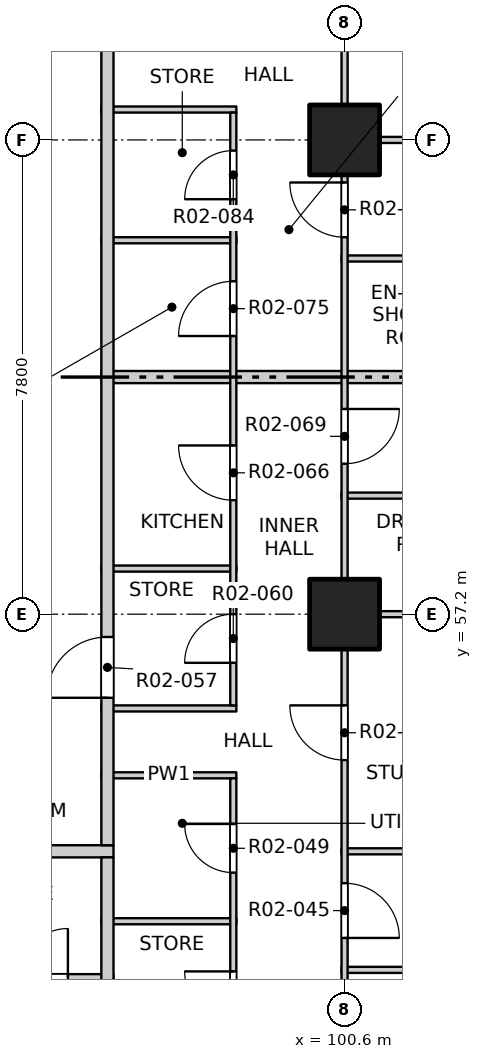
"""IFC4 building model, lengths in metres.
Left out: names, types, materials, properties, quantities, classifications, styles, units other than length and angle.
Written with IfcOpenShell. Run it as: python <this file> out.ifc"""

import sys

from ifc_helpers import new_model, si_unit, direction, frame, frame_2d, origin, origin_2d, place, context, subcontext, project, spatial, rectangle, extrude, element, fill, save


model = new_model("IFC4")
c1 = context("Model", 3, precision=1e-05, world=origin(), true_north=direction((0.0, 1.0)))
c2 = subcontext(c1, "Body", "Model", "MODEL_VIEW")
j1 = project(units=[si_unit("LENGTHUNIT", "METRE"), si_unit("PLANEANGLEUNIT", "RADIAN")], contexts=[c1])
p1 = place(None, origin())
s1 = spatial("IfcSite", under=j1, at=p1, CompositionType="ELEMENT")
p2 = place(p1, origin())
s2 = spatial("IfcBuilding", under=s1, at=p2, CompositionType="ELEMENT")
p3 = place(p2, frame((0.0, 0.0, 36.5)))
s3 = spatial("IfcBuildingStorey", under=s2, at=p3, CompositionType="ELEMENT", Elevation=36.5)
for number, where, z_axis, x_axis in (
    (1, (100.6, 57.2, -0.25), (0.0, 0.0, 1.0), (1.0, 0.0, 0.0)),
    (2, (100.6, 65.0, -0.25), (0.0, 0.0, 1.0), (1.0, 0.0, 0.0)),
):
    element("IfcColumn", number, at=place(p3, frame(where, z_axis=z_axis, x_axis=x_axis)), inside=s3, PredefinedType="COLUMN", context=c2, shape_type="SweptSolid", body=[
        extrude(rectangle(XDim=1.15, YDim=1.15, at=origin_2d()), origin(), (0.0, 0.0, 1.0), 3.4),
    ])
p4 = place(p3, frame((90.9, 51.23, 0.0), z_axis=(0.0, 0.0, 1.0), x_axis=(1.0, 0.0, 0.0)))
e3 = element("IfcWall", 3, at=p4, inside=s3, PredefinedType="PARTITIONING", context=c2, shape_type="SweptSolid", body=[
    extrude(rectangle(XDim=5.9, YDim=0.1, at=frame_2d((2.95, 0.0))), origin(), (0.0, 0.0, 1.0), 3.15),
])
p5 = place(p4, frame((0.5, 0.0, 0.0)))
e4 = element("IfcOpeningElement", 4, at=p5, cuts=e3, PredefinedType="OPENING", context=c2, shape_type="SweptSolid", body=[
    extrude(rectangle(XDim=0.9, YDim=2.1, at=frame_2d((0.45, 1.05))), frame((0.0, 0.06, 0.0), z_axis=(0.0, -1.0, 0.0), x_axis=(1.0, 0.0, 0.0)), (0.0, 0.0, 1.0), 0.12),
])
p6 = place(p4, frame((2.375, 0.0, 0.0)))
e5 = element("IfcOpeningElement", 5, at=p6, cuts=e3, PredefinedType="OPENING", context=c2, shape_type="SweptSolid", body=[
    extrude(rectangle(XDim=0.8, YDim=2.1, at=frame_2d((0.4, 1.05))), frame((0.0, 0.06, 0.0), z_axis=(0.0, -1.0, 0.0), x_axis=(1.0, 0.0, 0.0)), (0.0, 0.0, 1.0), 0.12),
])
p7 = place(p4, frame((4.35, 0.0, 0.0)))
e6 = element("IfcOpeningElement", 6, at=p7, cuts=e3, PredefinedType="OPENING", context=c2, shape_type="SweptSolid", body=[
    extrude(rectangle(XDim=0.8, YDim=2.1, at=frame_2d((0.4, 1.05))), frame((0.0, 0.06, 0.0), z_axis=(0.0, -1.0, 0.0), x_axis=(1.0, 0.0, 0.0)), (0.0, 0.0, 1.0), 0.12),
])
p8 = place(p3, frame((100.55, 51.35, 0.0), z_axis=(0.0, 0.0, 1.0), x_axis=(1.0, 0.0, 0.0)))
e7 = element("IfcWall", 7, at=p8, inside=s3, PredefinedType="PARTITIONING", context=c2, shape_type="SweptSolid", body=[
    extrude(rectangle(XDim=3.55, YDim=0.1, at=frame_2d((1.775, 0.0))), origin(), (0.0, 0.0, 1.0), 3.15),
])
p9 = place(p3, frame((96.6, 52.15, 0.0), z_axis=(0.0, 0.0, 1.0), x_axis=(1.0, 0.0, 0.0)))
e8 = element("IfcWall", 8, at=p9, inside=s3, PredefinedType="PARTITIONING", context=c2, shape_type="SweptSolid", body=[
    extrude(rectangle(XDim=2.22, YDim=0.1, at=frame_2d((1.11, 0.0))), origin(), (0.0, 0.0, 1.0), 3.15),
])
p10 = place(p3, frame((73.2, 53.3, 0.0), z_axis=(0.0, 0.0, 1.0), x_axis=(1.0, 0.0, 0.0)))
e9 = element("IfcWall", 9, at=p10, inside=s3, PredefinedType="PARTITIONING", context=c2, shape_type="SweptSolid", body=[
    extrude(rectangle(XDim=23.6, YDim=0.2, at=frame_2d((11.8, 0.0))), origin(), (0.0, 0.0, 1.0), 3.15),
])
p11 = place(p10, frame((5.925, 0.0, 0.0)))
e10 = element("IfcOpeningElement", 10, at=p11, cuts=e9, PredefinedType="OPENING", context=c2, shape_type="SweptSolid", body=[
    extrude(rectangle(XDim=1.0, YDim=2.1, at=frame_2d((0.5, 1.05))), frame((0.0, 0.11, 0.0), z_axis=(0.0, -1.0, 0.0), x_axis=(1.0, 0.0, 0.0)), (0.0, 0.0, 1.0), 0.22),
])
p12 = place(p10, frame((17.925, 0.0, 0.0)))
e11 = element("IfcOpeningElement", 11, at=p12, cuts=e9, PredefinedType="OPENING", context=c2, shape_type="SweptSolid", body=[
    extrude(rectangle(XDim=1.0, YDim=2.1, at=frame_2d((0.5, 1.05))), frame((0.0, 0.11, 0.0), z_axis=(0.0, -1.0, 0.0), x_axis=(1.0, 0.0, 0.0)), (0.0, 0.0, 1.0), 0.22),
])
p13 = place(p3, frame((100.55, 53.3, 0.0), z_axis=(0.0, 0.0, 1.0), x_axis=(1.0, 0.0, 0.0)))
e12 = element("IfcWall", 12, at=p13, inside=s3, PredefinedType="PARTITIONING", context=c2, shape_type="SweptSolid", body=[
    extrude(rectangle(XDim=7.55, YDim=0.1, at=frame_2d((3.775, 0.0))), origin(), (0.0, 0.0, 1.0), 3.15),
])
for number, where, z_axis, x_axis in (
    (13, (96.6, 54.55, 0.0), (0.0, 0.0, 1.0), (1.0, 0.0, 0.0)),
    (14, (96.6, 55.65, 0.0), (0.0, 0.0, 1.0), (1.0, 0.0, 0.0)),
):
    element("IfcWall", number, at=place(p3, frame(where, z_axis=z_axis, x_axis=x_axis)), inside=s3, PredefinedType="PARTITIONING", context=c2, shape_type="SweptSolid", body=[
        extrude(rectangle(XDim=2.22, YDim=0.1, at=frame_2d((1.11, 0.0))), origin(), (0.0, 0.0, 1.0), 3.15),
    ])
p14 = place(p3, frame((100.55, 57.2, 0.0), z_axis=(0.0, 0.0, 1.0), x_axis=(1.0, 0.0, 0.0)))
e15 = element("IfcWall", 15, at=p14, inside=s3, PredefinedType="PARTITIONING", context=c2, shape_type="SweptSolid", body=[
    extrude(rectangle(XDim=7.55, YDim=0.1, at=frame_2d((3.775, 0.0))), origin(), (0.0, 0.0, 1.0), 2.55),
])
p15 = place(p3, frame((96.6, 57.95, 0.0), z_axis=(0.0, 0.0, 1.0), x_axis=(1.0, 0.0, 0.0)))
e16 = element("IfcWall", 16, at=p15, inside=s3, PredefinedType="PARTITIONING", context=c2, shape_type="SweptSolid", body=[
    extrude(rectangle(XDim=2.22, YDim=0.1, at=frame_2d((1.11, 0.0))), origin(), (0.0, 0.0, 1.0), 3.15),
])
p16 = place(p3, frame((100.55, 59.15, 0.0), z_axis=(0.0, 0.0, 1.0), x_axis=(1.0, 0.0, 0.0)))
e17 = element("IfcWall", 17, at=p16, inside=s3, PredefinedType="PARTITIONING", context=c2, shape_type="SweptSolid", body=[
    extrude(rectangle(XDim=3.55, YDim=0.1, at=frame_2d((1.775, 0.0))), origin(), (0.0, 0.0, 1.0), 3.15),
])
p17 = place(p3, frame((96.6, 61.1, 0.0), z_axis=(0.0, 0.0, 1.0), x_axis=(1.0, 0.0, 0.0)))
e18 = element("IfcWall", 18, at=p17, inside=s3, PredefinedType="PARTITIONING", context=c2, shape_type="SweptSolid", body=[
    extrude(rectangle(XDim=11.5, YDim=0.2, at=frame_2d((5.75, 0.0))), origin(), (0.0, 0.0, 1.0), 3.15),
])
p18 = place(p3, frame((100.55, 63.05, 0.0), z_axis=(0.0, 0.0, 1.0), x_axis=(1.0, 0.0, 0.0)))
e19 = element("IfcWall", 19, at=p18, inside=s3, PredefinedType="PARTITIONING", context=c2, shape_type="SweptSolid", body=[
    extrude(rectangle(XDim=3.7, YDim=0.1, at=frame_2d((1.85, 0.0))), origin(), (0.0, 0.0, 1.0), 3.15),
])
p19 = place(p3, frame((96.6, 63.35, 0.0), z_axis=(0.0, 0.0, 1.0), x_axis=(1.0, 0.0, 0.0)))
e20 = element("IfcWall", 20, at=p19, inside=s3, PredefinedType="PARTITIONING", context=c2, shape_type="SweptSolid", body=[
    extrude(rectangle(XDim=2.22, YDim=0.1, at=frame_2d((1.11, 0.0))), origin(), (0.0, 0.0, 1.0), 3.15),
])
p20 = place(p3, frame((100.55, 65.0, 0.0), z_axis=(0.0, 0.0, 1.0), x_axis=(1.0, 0.0, 0.0)))
e21 = element("IfcWall", 21, at=p20, inside=s3, PredefinedType="PARTITIONING", context=c2, shape_type="SweptSolid", body=[
    extrude(rectangle(XDim=7.55, YDim=0.1, at=frame_2d((3.775, 0.0))), origin(), (0.0, 0.0, 1.0), 2.55),
])
p21 = place(p3, frame((96.6, 65.5, 0.0), z_axis=(0.0, 0.0, 1.0), x_axis=(1.0, 0.0, 0.0)))
e22 = element("IfcWall", 22, at=p21, inside=s3, PredefinedType="PARTITIONING", context=c2, shape_type="SweptSolid", body=[
    extrude(rectangle(XDim=2.22, YDim=0.1, at=frame_2d((1.11, 0.0))), origin(), (0.0, 0.0, 1.0), 3.15),
])
p22 = place(p3, frame((96.7, 41.9, 0.0), z_axis=(0.0, 0.0, 1.0), x_axis=(0.0, 1.0, 0.0)))
e23 = element("IfcWall", 23, at=p22, inside=s3, PredefinedType="PARTITIONING", context=c2, shape_type="SweptSolid", body=[
    extrude(rectangle(XDim=11.3, YDim=0.2, at=frame_2d((5.65, 0.0))), origin(), (0.0, 0.0, 1.0), 3.15),
])
p23 = place(p3, frame((96.7, 53.4, 0.0), z_axis=(0.0, 0.0, 1.0), x_axis=(0.0, 1.0, 0.0)))
e24 = element("IfcWall", 24, at=p23, inside=s3, PredefinedType="PARTITIONING", context=c2, shape_type="SweptSolid", body=[
    extrude(rectangle(XDim=31.0, YDim=0.2, at=frame_2d((15.5, 0.0))), origin(), (0.0, 0.0, 1.0), 3.15),
])
p24 = place(p23, frame((2.425, 0.0, 0.0)))
e25 = element("IfcOpeningElement", 25, at=p24, cuts=e24, PredefinedType="OPENING", context=c2, shape_type="SweptSolid", body=[
    extrude(rectangle(XDim=1.0, YDim=2.1, at=frame_2d((0.5, 1.05))), frame((0.0, 0.11, 0.0), z_axis=(0.0, -1.0, 0.0), x_axis=(1.0, 0.0, 0.0)), (0.0, 0.0, 1.0), 0.22),
])
p25 = place(p23, frame((13.375, 0.0, 0.0)))
e26 = element("IfcOpeningElement", 26, at=p25, cuts=e24, PredefinedType="OPENING", context=c2, shape_type="SweptSolid", body=[
    extrude(rectangle(XDim=1.0, YDim=2.1, at=frame_2d((0.5, 1.05))), frame((0.0, 0.11, 0.0), z_axis=(0.0, -1.0, 0.0), x_axis=(1.0, 0.0, 0.0)), (0.0, 0.0, 1.0), 0.22),
])
p26 = place(p23, frame((29.525, 0.0, 0.0)))
e27 = element("IfcOpeningElement", 27, at=p26, cuts=e24, PredefinedType="OPENING", context=c2, shape_type="SweptSolid", body=[
    extrude(rectangle(XDim=1.0, YDim=2.1, at=frame_2d((0.5, 1.05))), frame((0.0, 0.11, 0.0), z_axis=(0.0, -1.0, 0.0), x_axis=(1.0, 0.0, 0.0)), (0.0, 0.0, 1.0), 0.22),
])
p27 = place(p3, frame((98.77, 45.55, 0.0), z_axis=(0.0, 0.0, 1.0), x_axis=(0.0, 1.0, 0.0)))
e28 = element("IfcWall", 28, at=p27, inside=s3, PredefinedType="PARTITIONING", context=c2, shape_type="SweptSolid", body=[
    extrude(rectangle(XDim=8.95, YDim=0.1, at=frame_2d((4.475, 0.0))), origin(), (0.0, 0.0, 1.0), 3.15),
])
p28 = place(p27, frame((0.4, 0.0, 0.0)))
e29 = element("IfcOpeningElement", 29, at=p28, cuts=e28, PredefinedType="OPENING", context=c2, shape_type="SweptSolid", body=[
    extrude(rectangle(XDim=0.9, YDim=2.1, at=frame_2d((0.45, 1.05))), frame((0.0, 0.06, 0.0), z_axis=(0.0, -1.0, 0.0), x_axis=(1.0, 0.0, 0.0)), (0.0, 0.0, 1.0), 0.12),
])
p29 = place(p27, frame((2.5, 0.0, 0.0)))
e30 = element("IfcOpeningElement", 30, at=p29, cuts=e28, PredefinedType="OPENING", context=c2, shape_type="SweptSolid", body=[
    extrude(rectangle(XDim=0.9, YDim=2.1, at=frame_2d((0.45, 1.05))), frame((0.0, 0.06, 0.0), z_axis=(0.0, -1.0, 0.0), x_axis=(1.0, 0.0, 0.0)), (0.0, 0.0, 1.0), 0.12),
])
p30 = place(p27, frame((4.975, 0.0, 0.0)))
e31 = element("IfcOpeningElement", 31, at=p30, cuts=e28, PredefinedType="OPENING", context=c2, shape_type="SweptSolid", body=[
    extrude(rectangle(XDim=0.8, YDim=2.1, at=frame_2d((0.4, 1.05))), frame((0.0, 0.06, 0.0), z_axis=(0.0, -1.0, 0.0), x_axis=(1.0, 0.0, 0.0)), (0.0, 0.0, 1.0), 0.12),
])
p31 = place(p27, frame((7.4, 0.0, 0.0)))
e32 = element("IfcOpeningElement", 32, at=p31, cuts=e28, PredefinedType="OPENING", context=c2, shape_type="SweptSolid", body=[
    extrude(rectangle(XDim=0.8, YDim=2.1, at=frame_2d((0.4, 1.05))), frame((0.0, 0.06, 0.0), z_axis=(0.0, -1.0, 0.0), x_axis=(1.0, 0.0, 0.0)), (0.0, 0.0, 1.0), 0.12),
])
p32 = place(p3, frame((98.77, 55.7, 0.0), z_axis=(0.0, 0.0, 1.0), x_axis=(0.0, 1.0, 0.0)))
e33 = element("IfcWall", 33, at=p32, inside=s3, PredefinedType="PARTITIONING", context=c2, shape_type="SweptSolid", body=[
    extrude(rectangle(XDim=9.75, YDim=0.1, at=frame_2d((4.875, 0.0))), origin(), (0.0, 0.0, 1.0), 3.15),
])
p33 = place(p32, frame((0.7, 0.0, 0.0)))
e34 = element("IfcOpeningElement", 34, at=p33, cuts=e33, PredefinedType="OPENING", context=c2, shape_type="SweptSolid", body=[
    extrude(rectangle(XDim=0.8, YDim=2.1, at=frame_2d((0.4, 1.05))), frame((0.0, 0.06, 0.0), z_axis=(0.0, -1.0, 0.0), x_axis=(1.0, 0.0, 0.0)), (0.0, 0.0, 1.0), 0.12),
])
p34 = place(p32, frame((3.375, 0.0, 0.0)))
e35 = element("IfcOpeningElement", 35, at=p34, cuts=e33, PredefinedType="OPENING", context=c2, shape_type="SweptSolid", body=[
    extrude(rectangle(XDim=0.9, YDim=2.1, at=frame_2d((0.45, 1.05))), frame((0.0, 0.06, 0.0), z_axis=(0.0, -1.0, 0.0), x_axis=(1.0, 0.0, 0.0)), (0.0, 0.0, 1.0), 0.12),
])
p35 = place(p32, frame((6.075, 0.0, 0.0)))
e36 = element("IfcOpeningElement", 36, at=p35, cuts=e33, PredefinedType="OPENING", context=c2, shape_type="SweptSolid", body=[
    extrude(rectangle(XDim=0.9, YDim=2.1, at=frame_2d((0.45, 1.05))), frame((0.0, 0.06, 0.0), z_axis=(0.0, -1.0, 0.0), x_axis=(1.0, 0.0, 0.0)), (0.0, 0.0, 1.0), 0.12),
])
p36 = place(p32, frame((8.325, 0.0, 0.0)))
e37 = element("IfcOpeningElement", 37, at=p36, cuts=e33, PredefinedType="OPENING", context=c2, shape_type="SweptSolid", body=[
    extrude(rectangle(XDim=0.8, YDim=2.1, at=frame_2d((0.4, 1.05))), frame((0.0, 0.06, 0.0), z_axis=(0.0, -1.0, 0.0), x_axis=(1.0, 0.0, 0.0)), (0.0, 0.0, 1.0), 0.12),
])
p37 = place(p3, frame((100.6, 49.4, 0.0), z_axis=(0.0, 0.0, 1.0), x_axis=(0.0, 1.0, 0.0)))
e38 = element("IfcWall", 38, at=p37, inside=s3, PredefinedType="PARTITIONING", context=c2, shape_type="SweptSolid", body=[
    extrude(rectangle(XDim=31.2, YDim=0.1, at=frame_2d((15.6, 0.0))), origin(), (0.0, 0.0, 1.0), 3.15),
])
p38 = place(p37, frame((2.475, 0.0, 0.0)))
e39 = element("IfcOpeningElement", 39, at=p38, cuts=e38, PredefinedType="OPENING", context=c2, shape_type="SweptSolid", body=[
    extrude(rectangle(XDim=0.9, YDim=2.1, at=frame_2d((0.45, 1.05))), frame((0.0, 0.06, 0.0), z_axis=(0.0, -1.0, 0.0), x_axis=(1.0, 0.0, 0.0)), (0.0, 0.0, 1.0), 0.12),
])
p39 = place(p37, frame((5.4, 0.0, 0.0)))
e40 = element("IfcOpeningElement", 40, at=p39, cuts=e38, PredefinedType="OPENING", context=c2, shape_type="SweptSolid", body=[
    extrude(rectangle(XDim=0.9, YDim=2.1, at=frame_2d((0.45, 1.05))), frame((0.0, 0.06, 0.0), z_axis=(0.0, -1.0, 0.0), x_axis=(1.0, 0.0, 0.0)), (0.0, 0.0, 1.0), 0.12),
])
p40 = place(p37, frame((10.275, 0.0, 0.0)))
e41 = element("IfcOpeningElement", 41, at=p40, cuts=e38, PredefinedType="OPENING", context=c2, shape_type="SweptSolid", body=[
    extrude(rectangle(XDim=0.9, YDim=2.1, at=frame_2d((0.45, 1.05))), frame((0.0, 0.06, 0.0), z_axis=(0.0, -1.0, 0.0), x_axis=(1.0, 0.0, 0.0)), (0.0, 0.0, 1.0), 0.12),
])
p41 = place(p37, frame((14.0, 0.0, 0.0)))
e42 = element("IfcOpeningElement", 42, at=p41, cuts=e38, PredefinedType="OPENING", context=c2, shape_type="SweptSolid", body=[
    extrude(rectangle(XDim=0.9, YDim=2.1, at=frame_2d((0.45, 1.05))), frame((0.0, 0.06, 0.0), z_axis=(0.0, -1.0, 0.0), x_axis=(1.0, 0.0, 0.0)), (0.0, 0.0, 1.0), 0.12),
])
p42 = place(p37, frame((17.1, 0.0, 0.0)))
e43 = element("IfcOpeningElement", 43, at=p42, cuts=e38, PredefinedType="OPENING", context=c2, shape_type="SweptSolid", body=[
    extrude(rectangle(XDim=0.9, YDim=2.1, at=frame_2d((0.45, 1.05))), frame((0.0, 0.06, 0.0), z_axis=(0.0, -1.0, 0.0), x_axis=(1.0, 0.0, 0.0)), (0.0, 0.0, 1.0), 0.12),
])
p43 = place(p37, frame((21.0, 0.0, 0.0)))
e44 = element("IfcOpeningElement", 44, at=p43, cuts=e38, PredefinedType="OPENING", context=c2, shape_type="SweptSolid", body=[
    extrude(rectangle(XDim=0.9, YDim=2.1, at=frame_2d((0.45, 1.05))), frame((0.0, 0.06, 0.0), z_axis=(0.0, -1.0, 0.0), x_axis=(1.0, 0.0, 0.0)), (0.0, 0.0, 1.0), 0.12),
])
p44 = place(p37, frame((25.875, 0.0, 0.0)))
e45 = element("IfcOpeningElement", 45, at=p44, cuts=e38, PredefinedType="OPENING", context=c2, shape_type="SweptSolid", body=[
    extrude(rectangle(XDim=0.9, YDim=2.1, at=frame_2d((0.45, 1.05))), frame((0.0, 0.06, 0.0), z_axis=(0.0, -1.0, 0.0), x_axis=(1.0, 0.0, 0.0)), (0.0, 0.0, 1.0), 0.12),
])
p45 = place(p37, frame((29.6, 0.0, 0.0)))
e46 = element("IfcOpeningElement", 46, at=p45, cuts=e38, PredefinedType="OPENING", context=c2, shape_type="SweptSolid", body=[
    extrude(rectangle(XDim=0.9, YDim=2.1, at=frame_2d((0.45, 1.05))), frame((0.0, 0.06, 0.0), z_axis=(0.0, -1.0, 0.0), x_axis=(1.0, 0.0, 0.0)), (0.0, 0.0, 1.0), 0.12),
])
p46 = place(p30, origin())
e47 = element("IfcDoor", 47, at=p46, inside=s3, OperationType="SINGLE_SWING_RIGHT", PredefinedType="DOOR", context=c2, shape_type="SweptSolid", body=[
    extrude(rectangle(XDim=0.8, YDim=2.1, at=frame_2d((0.4, 1.05))), frame((0.0, 0.025, 0.0), z_axis=(0.0, -1.0, 0.0), x_axis=(1.0, 0.0, 0.0)), (0.0, 0.0, 1.0), 0.05),
])
fill(e31, e47)
p47 = place(p7, origin())
e48 = element("IfcDoor", 48, at=p47, inside=s3, OperationType="SINGLE_SWING_RIGHT", PredefinedType="DOOR", context=c2, shape_type="SweptSolid", body=[
    extrude(rectangle(XDim=0.8, YDim=2.1, at=frame_2d((0.4, 1.05))), frame((0.0, 0.025, 0.0), z_axis=(0.0, -1.0, 0.0), x_axis=(1.0, 0.0, 0.0)), (0.0, 0.0, 1.0), 0.05),
])
fill(e6, e48)
p48 = place(p38, origin())
e49 = element("IfcDoor", 49, at=p48, inside=s3, OperationType="SINGLE_SWING_RIGHT", PredefinedType="DOOR", context=c2, shape_type="SweptSolid", body=[
    extrude(rectangle(XDim=0.9, YDim=2.1, at=frame_2d((0.45, 1.05))), frame((0.0, 0.025, 0.0), z_axis=(0.0, -1.0, 0.0), x_axis=(1.0, 0.0, 0.0)), (0.0, 0.0, 1.0), 0.05),
])
fill(e39, e49)
p49 = place(p31, origin())
e50 = element("IfcDoor", 50, at=p49, inside=s3, OperationType="SINGLE_SWING_RIGHT", PredefinedType="DOOR", context=c2, shape_type="SweptSolid", body=[
    extrude(rectangle(XDim=0.8, YDim=2.1, at=frame_2d((0.4, 1.05))), frame((0.0, 0.025, 0.0), z_axis=(0.0, -1.0, 0.0), x_axis=(1.0, 0.0, 0.0)), (0.0, 0.0, 1.0), 0.05),
])
fill(e32, e50)
p50 = place(p39, origin())
e51 = element("IfcDoor", 51, at=p50, inside=s3, OperationType="SINGLE_SWING_RIGHT", PredefinedType="DOOR", context=c2, shape_type="SweptSolid", body=[
    extrude(rectangle(XDim=0.9, YDim=2.1, at=frame_2d((0.45, 1.05))), frame((0.0, 0.025, 0.0), z_axis=(0.0, -1.0, 0.0), x_axis=(1.0, 0.0, 0.0)), (0.0, 0.0, 1.0), 0.05),
])
fill(e40, e51)
p51 = place(p24, origin())
e52 = element("IfcDoor", 52, at=p51, inside=s3, OperationType="SINGLE_SWING_LEFT", PredefinedType="DOOR", context=c2, shape_type="SweptSolid", body=[
    extrude(rectangle(XDim=1.0, YDim=2.1, at=frame_2d((0.5, 1.05))), frame((0.0, 0.025, 0.0), z_axis=(0.0, -1.0, 0.0), x_axis=(1.0, 0.0, 0.0)), (0.0, 0.0, 1.0), 0.05),
])
fill(e25, e52)
p52 = place(p33, origin())
e53 = element("IfcDoor", 53, at=p52, inside=s3, OperationType="SINGLE_SWING_LEFT", PredefinedType="DOOR", context=c2, shape_type="SweptSolid", body=[
    extrude(rectangle(XDim=0.8, YDim=2.1, at=frame_2d((0.4, 1.05))), frame((0.0, 0.025, 0.0), z_axis=(0.0, -1.0, 0.0), x_axis=(1.0, 0.0, 0.0)), (0.0, 0.0, 1.0), 0.05),
])
fill(e34, e53)
p53 = place(p34, origin())
e54 = element("IfcDoor", 54, at=p53, inside=s3, OperationType="SINGLE_SWING_RIGHT", PredefinedType="DOOR", context=c2, shape_type="SweptSolid", body=[
    extrude(rectangle(XDim=0.9, YDim=2.1, at=frame_2d((0.45, 1.05))), frame((0.0, 0.025, 0.0), z_axis=(0.0, -1.0, 0.0), x_axis=(1.0, 0.0, 0.0)), (0.0, 0.0, 1.0), 0.05),
])
fill(e35, e54)
p54 = place(p40, origin())
e55 = element("IfcDoor", 55, at=p54, inside=s3, OperationType="SINGLE_SWING_LEFT", PredefinedType="DOOR", context=c2, shape_type="SweptSolid", body=[
    extrude(rectangle(XDim=0.9, YDim=2.1, at=frame_2d((0.45, 1.05))), frame((0.0, 0.025, 0.0), z_axis=(0.0, -1.0, 0.0), x_axis=(1.0, 0.0, 0.0)), (0.0, 0.0, 1.0), 0.05),
])
fill(e41, e55)
p55 = place(p35, origin())
e56 = element("IfcDoor", 56, at=p55, inside=s3, OperationType="SINGLE_SWING_LEFT", PredefinedType="DOOR", context=c2, shape_type="SweptSolid", body=[
    extrude(rectangle(XDim=0.9, YDim=2.1, at=frame_2d((0.45, 1.05))), frame((0.0, 0.025, 0.0), z_axis=(0.0, -1.0, 0.0), x_axis=(1.0, 0.0, 0.0)), (0.0, 0.0, 1.0), 0.05),
])
fill(e36, e56)
p56 = place(p41, origin())
e57 = element("IfcDoor", 57, at=p56, inside=s3, OperationType="SINGLE_SWING_RIGHT", PredefinedType="DOOR", context=c2, shape_type="SweptSolid", body=[
    extrude(rectangle(XDim=0.9, YDim=2.1, at=frame_2d((0.45, 1.05))), frame((0.0, 0.025, 0.0), z_axis=(0.0, -1.0, 0.0), x_axis=(1.0, 0.0, 0.0)), (0.0, 0.0, 1.0), 0.05),
])
fill(e42, e57)
p57 = place(p36, origin())
e58 = element("IfcDoor", 58, at=p57, inside=s3, OperationType="SINGLE_SWING_LEFT", PredefinedType="DOOR", context=c2, shape_type="SweptSolid", body=[
    extrude(rectangle(XDim=0.8, YDim=2.1, at=frame_2d((0.4, 1.05))), frame((0.0, 0.025, 0.0), z_axis=(0.0, -1.0, 0.0), x_axis=(1.0, 0.0, 0.0)), (0.0, 0.0, 1.0), 0.05),
])
fill(e37, e58)
save(model, sys.argv[1])
